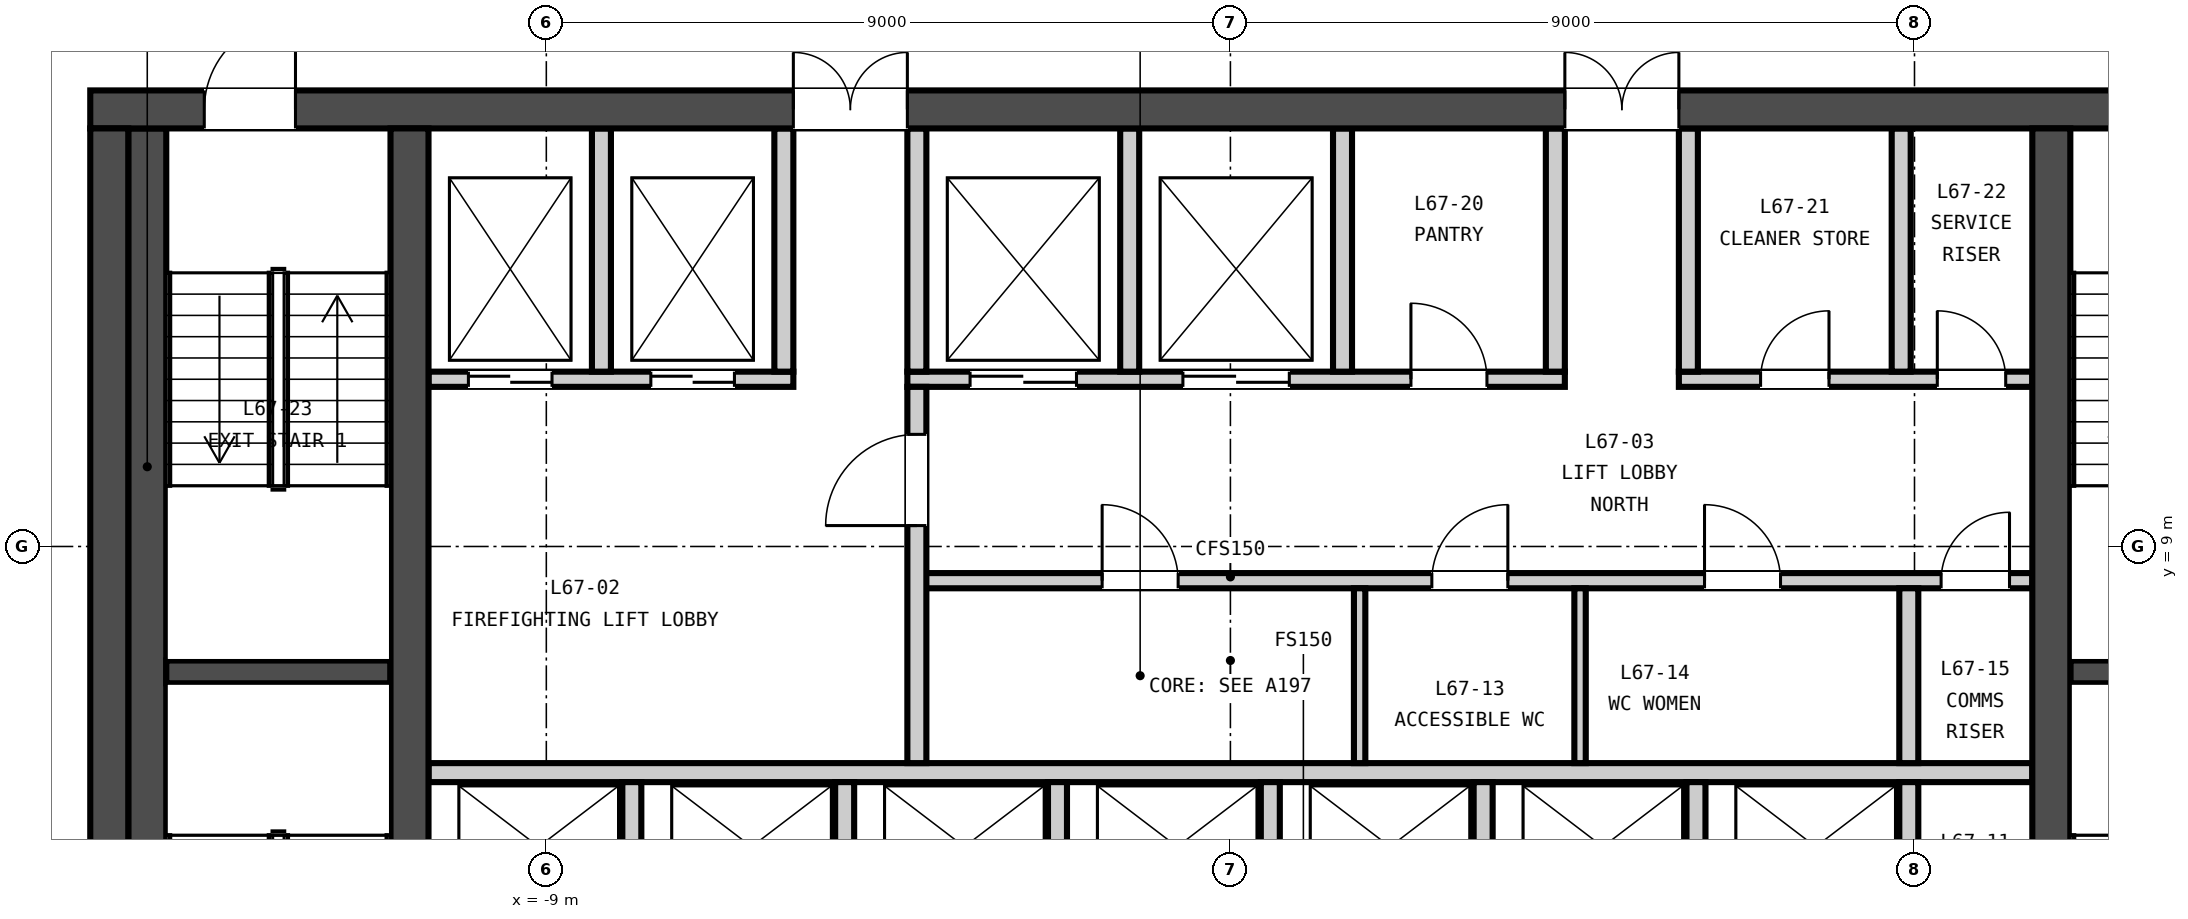
"""IFC4 building model, lengths in metres.
Left out: names, types, materials, properties, quantities, classifications, styles, units other than length and angle.
Written with IfcOpenShell. Run it as: python <this file> out.ifc"""

import sys

from ifc_helpers import new_model, si_unit, direction, frame, frame_2d, origin, place, context, subcontext, project, spatial, rectangle, extrude, element, fill, save


model = new_model("IFC4")
c1 = context("Model", 3, precision=1e-05, world=origin(), true_north=direction((0.0, 1.0)))
c2 = subcontext(c1, "Body", "Model", "MODEL_VIEW")
j1 = project(units=[si_unit("LENGTHUNIT", "METRE"), si_unit("PLANEANGLEUNIT", "RADIAN")], contexts=[c1])
p1 = place(None, origin())
s1 = spatial("IfcSite", under=j1, at=p1, CompositionType="ELEMENT")
p2 = place(p1, origin())
s2 = spatial("IfcBuilding", under=s1, at=p2, CompositionType="ELEMENT")
p3 = place(p2, frame((0.0, 0.0, 264.6)))
s3 = spatial("IfcBuildingStorey", under=s2, at=p3, CompositionType="ELEMENT", Elevation=264.6)
p4 = place(p3, frame((-15.0, 14.75, -0.15), z_axis=(0.0, 0.0, 1.0), x_axis=(1.0, 0.0, 0.0)))
e1 = element("IfcWall", 1, at=p4, inside=s3, PredefinedType="SOLIDWALL", context=c2, shape_type="SweptSolid", body=[
    extrude(rectangle(XDim=30.0, YDim=0.5, at=frame_2d((15.0, 0.0))), origin(), (0.0, 0.0, 1.0), 3.65),
])
p5 = place(p4, frame((9.25, 0.0, 0.15)))
e2 = element("IfcOpeningElement", 2, at=p5, cuts=e1, PredefinedType="OPENING", context=c2, shape_type="SweptSolid", body=[
    extrude(rectangle(XDim=1.5, YDim=2.1, at=frame_2d((0.75, 1.05))), frame((0.0, 0.26, 0.0), z_axis=(0.0, -1.0, 0.0), x_axis=(1.0, 0.0, 0.0)), (0.0, 0.0, 1.0), 0.52),
])
p6 = place(p4, frame((19.4, 0.0, 0.15)))
e3 = element("IfcOpeningElement", 3, at=p6, cuts=e1, PredefinedType="OPENING", context=c2, shape_type="SweptSolid", body=[
    extrude(rectangle(XDim=1.5, YDim=2.1, at=frame_2d((0.75, 1.05))), frame((0.0, 0.26, 0.0), z_axis=(0.0, -1.0, 0.0), x_axis=(1.0, 0.0, 0.0)), (0.0, 0.0, 1.0), 0.52),
])
p7 = place(p4, frame((1.5, 0.0, 0.15)))
e4 = element("IfcOpeningElement", 4, at=p7, cuts=e1, PredefinedType="OPENING", context=c2, shape_type="SweptSolid", body=[
    extrude(rectangle(XDim=1.2, YDim=2.1, at=frame_2d((0.6, 1.05))), frame((0.0, 0.26, 0.0), z_axis=(0.0, -1.0, 0.0), x_axis=(1.0, 0.0, 0.0)), (0.0, 0.0, 1.0), 0.52),
])
p8 = place(p4, frame((27.3, 0.0, 0.15)))
e5 = element("IfcOpeningElement", 5, at=p8, cuts=e1, PredefinedType="OPENING", context=c2, shape_type="SweptSolid", body=[
    extrude(rectangle(XDim=1.2, YDim=2.1, at=frame_2d((0.6, 1.05))), frame((0.0, 0.26, 0.0), z_axis=(0.0, -1.0, 0.0), x_axis=(1.0, 0.0, 0.0)), (0.0, 0.0, 1.0), 0.52),
])
for number, where, z_axis, x_axis in (
    (6, (-14.75, 0.5, -0.15), (0.0, 0.0, 1.0), (0.0, 1.0, 0.0)),
    (7, (-10.8, 0.5, -0.15), (0.0, 0.0, 1.0), (0.0, 1.0, 0.0)),
    (8, (10.8, 0.5, -0.15), (0.0, 0.0, 1.0), (0.0, 1.0, 0.0)),
):
    element("IfcWall", number, at=place(p3, frame(where, z_axis=z_axis, x_axis=x_axis)), inside=s3, PredefinedType="SOLIDWALL", context=c2, shape_type="SweptSolid", body=[
        extrude(rectangle(XDim=14.0, YDim=0.5, at=frame_2d((7.0, 0.0))), origin(), (0.0, 0.0, 1.0), 3.65),
    ])
p9 = place(p3, frame((-10.55, 6.025, 0.0), z_axis=(0.0, 0.0, 1.0), x_axis=(1.0, 0.0, 0.0)))
e9 = element("IfcWall", 9, at=p9, inside=s3, PredefinedType="PARTITIONING", context=c2, shape_type="SweptSolid", body=[
    extrude(rectangle(XDim=21.1, YDim=0.25, at=frame_2d((10.55, 0.0))), origin(), (0.0, 0.0, 1.0), 3.5),
])
p10 = place(p3, frame((-4.125, 8.55, 0.0), z_axis=(0.0, 0.0, 1.0), x_axis=(1.0, 0.0, 0.0)))
e10 = element("IfcWall", 10, at=p10, inside=s3, PredefinedType="PARTITIONING", context=c2, shape_type="SweptSolid", body=[
    extrude(rectangle(XDim=14.675, YDim=0.2, at=frame_2d((7.337, 0.0))), origin(), (0.0, 0.0, 1.0), 3.5),
])
p11 = place(p10, frame((2.438, 0.0, 0.0)))
e11 = element("IfcOpeningElement", 11, at=p11, cuts=e10, PredefinedType="OPENING", context=c2, shape_type="SweptSolid", body=[
    extrude(rectangle(XDim=1.0, YDim=2.1, at=frame_2d((0.5, 1.05))), frame((0.0, 0.11, 0.0), z_axis=(0.0, -1.0, 0.0), x_axis=(1.0, 0.0, 0.0)), (0.0, 0.0, 1.0), 0.22),
])
p12 = place(p10, frame((6.775, 0.0, 0.0)))
e12 = element("IfcOpeningElement", 12, at=p12, cuts=e10, PredefinedType="OPENING", context=c2, shape_type="SweptSolid", body=[
    extrude(rectangle(XDim=1.0, YDim=2.1, at=frame_2d((0.5, 1.05))), frame((0.0, 0.11, 0.0), z_axis=(0.0, -1.0, 0.0), x_axis=(1.0, 0.0, 0.0)), (0.0, 0.0, 1.0), 0.22),
])
p13 = place(p10, frame((10.363, 0.0, 0.0)))
e13 = element("IfcOpeningElement", 13, at=p13, cuts=e10, PredefinedType="OPENING", context=c2, shape_type="SweptSolid", body=[
    extrude(rectangle(XDim=1.0, YDim=2.1, at=frame_2d((0.5, 1.05))), frame((0.0, 0.11, 0.0), z_axis=(0.0, -1.0, 0.0), x_axis=(1.0, 0.0, 0.0)), (0.0, 0.0, 1.0), 0.22),
])
p14 = place(p10, frame((13.475, 0.0, 0.0)))
e14 = element("IfcOpeningElement", 14, at=p14, cuts=e10, PredefinedType="OPENING", context=c2, shape_type="SweptSolid", body=[
    extrude(rectangle(XDim=0.9, YDim=2.1, at=frame_2d((0.45, 1.05))), frame((0.0, 0.11, 0.0), z_axis=(0.0, -1.0, 0.0), x_axis=(1.0, 0.0, 0.0)), (0.0, 0.0, 1.0), 0.22),
])
p15 = place(p3, frame((-10.55, 11.2, 0.0), z_axis=(0.0, 0.0, 1.0), x_axis=(1.0, 0.0, 0.0)))
e15 = element("IfcWall", 15, at=p15, inside=s3, PredefinedType="PARTITIONING", context=c2, shape_type="SweptSolid", body=[
    extrude(rectangle(XDim=4.8, YDim=0.2, at=frame_2d((2.4, 0.0))), origin(), (0.0, 0.0, 1.0), 3.5),
])
p16 = place(p15, frame((0.525, 0.0, 0.0)))
e16 = element("IfcOpeningElement", 16, at=p16, cuts=e15, PredefinedType="OPENING", context=c2, shape_type="SweptSolid", body=[
    extrude(rectangle(XDim=1.1, YDim=2.1, at=frame_2d((0.55, 1.05))), frame((0.0, 0.11, 0.0), z_axis=(0.0, -1.0, 0.0), x_axis=(1.0, 0.0, 0.0)), (0.0, 0.0, 1.0), 0.22),
])
p17 = place(p15, frame((2.925, 0.0, 0.0)))
e17 = element("IfcOpeningElement", 17, at=p17, cuts=e15, PredefinedType="OPENING", context=c2, shape_type="SweptSolid", body=[
    extrude(rectangle(XDim=1.1, YDim=2.1, at=frame_2d((0.55, 1.05))), frame((0.0, 0.11, 0.0), z_axis=(0.0, -1.0, 0.0), x_axis=(1.0, 0.0, 0.0)), (0.0, 0.0, 1.0), 0.22),
])
p18 = place(p3, frame((-4.25, 11.2, 0.0), z_axis=(0.0, 0.0, 1.0), x_axis=(1.0, 0.0, 0.0)))
e18 = element("IfcWall", 18, at=p18, inside=s3, PredefinedType="PARTITIONING", context=c2, shape_type="SweptSolid", body=[
    extrude(rectangle(XDim=8.65, YDim=0.2, at=frame_2d((4.325, 0.0))), origin(), (0.0, 0.0, 1.0), 3.5),
])
p19 = place(p18, frame((0.825, 0.0, 0.0)))
e19 = element("IfcOpeningElement", 19, at=p19, cuts=e18, PredefinedType="OPENING", context=c2, shape_type="SweptSolid", body=[
    extrude(rectangle(XDim=1.4, YDim=2.1, at=frame_2d((0.7, 1.05))), frame((0.0, 0.11, 0.0), z_axis=(0.0, -1.0, 0.0), x_axis=(1.0, 0.0, 0.0)), (0.0, 0.0, 1.0), 0.22),
])
p20 = place(p18, frame((3.625, 0.0, 0.0)))
e20 = element("IfcOpeningElement", 20, at=p20, cuts=e18, PredefinedType="OPENING", context=c2, shape_type="SweptSolid", body=[
    extrude(rectangle(XDim=1.4, YDim=2.1, at=frame_2d((0.7, 1.05))), frame((0.0, 0.11, 0.0), z_axis=(0.0, -1.0, 0.0), x_axis=(1.0, 0.0, 0.0)), (0.0, 0.0, 1.0), 0.22),
])
p21 = place(p18, frame((6.625, 0.0, 0.0)))
e21 = element("IfcOpeningElement", 21, at=p21, cuts=e18, PredefinedType="OPENING", context=c2, shape_type="SweptSolid", body=[
    extrude(rectangle(XDim=1.0, YDim=2.1, at=frame_2d((0.5, 1.05))), frame((0.0, 0.11, 0.0), z_axis=(0.0, -1.0, 0.0), x_axis=(1.0, 0.0, 0.0)), (0.0, 0.0, 1.0), 0.22),
])
p22 = place(p3, frame((5.9, 11.2, 0.0), z_axis=(0.0, 0.0, 1.0), x_axis=(1.0, 0.0, 0.0)))
e22 = element("IfcWall", 22, at=p22, inside=s3, PredefinedType="PARTITIONING", context=c2, shape_type="SweptSolid", body=[
    extrude(rectangle(XDim=4.65, YDim=0.2, at=frame_2d((2.325, 0.0))), origin(), (0.0, 0.0, 1.0), 3.5),
])
p23 = place(p22, frame((1.075, 0.0, 0.0)))
e23 = element("IfcOpeningElement", 23, at=p23, cuts=e22, PredefinedType="OPENING", context=c2, shape_type="SweptSolid", body=[
    extrude(rectangle(XDim=0.9, YDim=2.1, at=frame_2d((0.45, 1.05))), frame((0.0, 0.11, 0.0), z_axis=(0.0, -1.0, 0.0), x_axis=(1.0, 0.0, 0.0)), (0.0, 0.0, 1.0), 0.22),
])
p24 = place(p22, frame((3.4, 0.0, 0.0)))
e24 = element("IfcOpeningElement", 24, at=p24, cuts=e22, PredefinedType="OPENING", context=c2, shape_type="SweptSolid", body=[
    extrude(rectangle(XDim=0.9, YDim=2.1, at=frame_2d((0.45, 1.05))), frame((0.0, 0.11, 0.0), z_axis=(0.0, -1.0, 0.0), x_axis=(1.0, 0.0, 0.0)), (0.0, 0.0, 1.0), 0.22),
])
p25 = place(p3, frame((-4.125, 6.15, 0.0), z_axis=(0.0, 0.0, 1.0), x_axis=(0.0, 1.0, 0.0)))
e25 = element("IfcWall", 25, at=p25, inside=s3, PredefinedType="PARTITIONING", context=c2, shape_type="SweptSolid", body=[
    extrude(rectangle(XDim=4.95, YDim=0.25, at=frame_2d((2.475, 0.0))), origin(), (0.0, 0.0, 1.0), 3.5),
])
p26 = place(p25, frame((3.125, 0.0, 0.0)))
e26 = element("IfcOpeningElement", 26, at=p26, cuts=e25, PredefinedType="OPENING", context=c2, shape_type="SweptSolid", body=[
    extrude(rectangle(XDim=1.2, YDim=2.1, at=frame_2d((0.6, 1.05))), frame((0.0, 0.135, 0.0), z_axis=(0.0, -1.0, 0.0), x_axis=(1.0, 0.0, 0.0)), (0.0, 0.0, 1.0), 0.27),
])
for number, where, z_axis, x_axis in (
    (27, (-7.875, 3.6, 0.0), (0.0, 0.0, 1.0), (0.0, 1.0, 0.0)),
    (28, (-5.075, 3.6, 0.0), (0.0, 0.0, 1.0), (0.0, 1.0, 0.0)),
    (29, (-2.275, 3.6, 0.0), (0.0, 0.0, 1.0), (0.0, 1.0, 0.0)),
    (30, (0.525, 3.6, 0.0), (0.0, 0.0, 1.0), (0.0, 1.0, 0.0)),
    (31, (3.325, 3.6, 0.0), (0.0, 0.0, 1.0), (0.0, 1.0, 0.0)),
    (32, (6.125, 3.6, 0.0), (0.0, 0.0, 1.0), (0.0, 1.0, 0.0)),
    (33, (8.925, 3.6, 0.0), (0.0, 0.0, 1.0), (0.0, 1.0, 0.0)),
):
    element("IfcWall", number, at=place(p3, frame(where, z_axis=z_axis, x_axis=x_axis)), inside=s3, PredefinedType="PARTITIONING", context=c2, shape_type="SweptSolid", body=[
        extrude(rectangle(XDim=2.3, YDim=0.25, at=frame_2d((1.15, 0.0))), origin(), (0.0, 0.0, 1.0), 3.5),
    ])
for number, where, z_axis, x_axis in (
    (34, (1.7, 6.15, 0.0), (0.0, 0.0, 1.0), (0.0, 1.0, 0.0)),
    (35, (4.6, 6.15, 0.0), (0.0, 0.0, 1.0), (0.0, 1.0, 0.0)),
):
    element("IfcWall", number, at=place(p3, frame(where, z_axis=z_axis, x_axis=x_axis)), inside=s3, PredefinedType="PARTITIONING", context=c2, shape_type="SweptSolid", body=[
        extrude(rectangle(XDim=2.3, YDim=0.15, at=frame_2d((1.15, 0.0))), origin(), (0.0, 0.0, 1.0), 3.5),
    ])
p27 = place(p3, frame((8.925, 6.15, 0.0), z_axis=(0.0, 0.0, 1.0), x_axis=(0.0, 1.0, 0.0)))
e36 = element("IfcWall", 36, at=p27, inside=s3, PredefinedType="PARTITIONING", context=c2, shape_type="SweptSolid", body=[
    extrude(rectangle(XDim=2.3, YDim=0.25, at=frame_2d((1.15, 0.0))), origin(), (0.0, 0.0, 1.0), 3.5),
])
for number, where, z_axis, x_axis in (
    (37, (-8.275, 11.3, 0.0), (0.0, 0.0, 1.0), (0.0, 1.0, 0.0)),
    (38, (-5.875, 11.3, 0.0), (0.0, 0.0, 1.0), (0.0, 1.0, 0.0)),
    (39, (-4.125, 11.3, 0.0), (0.0, 0.0, 1.0), (0.0, 1.0, 0.0)),
    (40, (-1.325, 11.3, 0.0), (0.0, 0.0, 1.0), (0.0, 1.0, 0.0)),
    (41, (1.475, 11.3, 0.0), (0.0, 0.0, 1.0), (0.0, 1.0, 0.0)),
    (42, (4.275, 11.3, 0.0), (0.0, 0.0, 1.0), (0.0, 1.0, 0.0)),
    (43, (6.025, 11.3, 0.0), (0.0, 0.0, 1.0), (0.0, 1.0, 0.0)),
    (44, (8.825, 11.3, 0.0), (0.0, 0.0, 1.0), (0.0, 1.0, 0.0)),
):
    element("IfcWall", number, at=place(p3, frame(where, z_axis=z_axis, x_axis=x_axis)), inside=s3, PredefinedType="PARTITIONING", context=c2, shape_type="SweptSolid", body=[
        extrude(rectangle(XDim=3.2, YDim=0.25, at=frame_2d((1.6, 0.0))), origin(), (0.0, 0.0, 1.0), 3.5),
    ])
p28 = place(p3, frame((-14.0, 7.35, 0.0), z_axis=(0.0, 0.0, 1.0), x_axis=(1.0, 0.0, 0.0)))
e45 = element("IfcWall", 45, at=p28, inside=s3, PredefinedType="SOLIDWALL", context=c2, shape_type="SweptSolid", body=[
    extrude(rectangle(XDim=2.95, YDim=0.3, at=frame_2d((1.475, 0.0))), origin(), (0.0, 0.0, 1.0), 3.5),
])
p29 = place(p3, frame((-14.25, 0.5, 0.0), z_axis=(0.0, 0.0, 1.0), x_axis=(0.0, 1.0, 0.0)))
e46 = element("IfcWall", 46, at=p29, inside=s3, PredefinedType="SOLIDWALL", context=c2, shape_type="SweptSolid", body=[
    extrude(rectangle(XDim=14.0, YDim=0.5, at=frame_2d((7.0, 0.0))), origin(), (0.0, 0.0, 1.0), 3.5),
])
p30 = place(p3, frame((11.05, 7.35, 0.0), z_axis=(0.0, 0.0, 1.0), x_axis=(1.0, 0.0, 0.0)))
e47 = element("IfcWall", 47, at=p30, inside=s3, PredefinedType="SOLIDWALL", context=c2, shape_type="SweptSolid", body=[
    extrude(rectangle(XDim=2.95, YDim=0.3, at=frame_2d((1.475, 0.0))), origin(), (0.0, 0.0, 1.0), 3.5),
])
p31 = place(p3, frame((-17.377, 11.232, 0.0), z_axis=(0.0, 0.0, 1.0), x_axis=(0.309001632963, 0.951061507383, 0.0)))
e48 = element("IfcWall", 48, at=p31, inside=s3, PredefinedType="PARTITIONING", context=c2, shape_type="SweptSolid", body=[
    extrude(rectangle(XDim=6.211, YDim=0.15, at=frame_2d((3.105, 0.0))), origin(), (0.0, 0.0, 1.0), 2.75),
])
p32 = place(p26, origin())
e49 = element("IfcDoor", 49, at=p32, inside=s3, OperationType="SINGLE_SWING_LEFT", PredefinedType="DOOR", context=c2, shape_type="SweptSolid", body=[
    extrude(rectangle(XDim=1.2, YDim=2.1, at=frame_2d((0.6, 1.05))), frame((0.0, 0.025, 0.0), z_axis=(0.0, -1.0, 0.0), x_axis=(1.0, 0.0, 0.0)), (0.0, 0.0, 1.0), 0.05),
])
fill(e26, e49)
p33 = place(p11, origin())
e50 = element("IfcDoor", 50, at=p33, inside=s3, OperationType="SINGLE_SWING_LEFT", PredefinedType="DOOR", context=c2, shape_type="SweptSolid", body=[
    extrude(rectangle(XDim=1.0, YDim=2.1, at=frame_2d((0.5, 1.05))), frame((0.0, 0.025, 0.0), z_axis=(0.0, -1.0, 0.0), x_axis=(1.0, 0.0, 0.0)), (0.0, 0.0, 1.0), 0.05),
])
fill(e11, e50)
p34 = place(p12, origin())
e51 = element("IfcDoor", 51, at=p34, inside=s3, OperationType="SINGLE_SWING_RIGHT", PredefinedType="DOOR", context=c2, shape_type="SweptSolid", body=[
    extrude(rectangle(XDim=1.0, YDim=2.1, at=frame_2d((0.5, 1.05))), frame((0.0, 0.025, 0.0), z_axis=(0.0, -1.0, 0.0), x_axis=(1.0, 0.0, 0.0)), (0.0, 0.0, 1.0), 0.05),
])
fill(e12, e51)
p35 = place(p13, origin())
e52 = element("IfcDoor", 52, at=p35, inside=s3, OperationType="SINGLE_SWING_LEFT", PredefinedType="DOOR", context=c2, shape_type="SweptSolid", body=[
    extrude(rectangle(XDim=1.0, YDim=2.1, at=frame_2d((0.5, 1.05))), frame((0.0, 0.025, 0.0), z_axis=(0.0, -1.0, 0.0), x_axis=(1.0, 0.0, 0.0)), (0.0, 0.0, 1.0), 0.05),
])
fill(e13, e52)
p36 = place(p14, origin())
e53 = element("IfcDoor", 53, at=p36, inside=s3, OperationType="SINGLE_SWING_RIGHT", PredefinedType="DOOR", context=c2, shape_type="SweptSolid", body=[
    extrude(rectangle(XDim=0.9, YDim=2.1, at=frame_2d((0.45, 1.05))), frame((0.0, 0.025, 0.0), z_axis=(0.0, -1.0, 0.0), x_axis=(1.0, 0.0, 0.0)), (0.0, 0.0, 1.0), 0.05),
])
fill(e14, e53)
p37 = place(p16, origin())
e54 = element("IfcDoor", 54, at=p37, inside=s3, OperationType="DOUBLE_DOOR_SLIDING", PredefinedType="DOOR", context=c2, shape_type="SweptSolid", body=[
    extrude(rectangle(XDim=1.1, YDim=2.1, at=frame_2d((0.55, 1.05))), frame((0.0, 0.025, 0.0), z_axis=(0.0, -1.0, 0.0), x_axis=(1.0, 0.0, 0.0)), (0.0, 0.0, 1.0), 0.05),
])
fill(e16, e54)
p38 = place(p17, origin())
e55 = element("IfcDoor", 55, at=p38, inside=s3, OperationType="DOUBLE_DOOR_SLIDING", PredefinedType="DOOR", context=c2, shape_type="SweptSolid", body=[
    extrude(rectangle(XDim=1.1, YDim=2.1, at=frame_2d((0.55, 1.05))), frame((0.0, 0.025, 0.0), z_axis=(0.0, -1.0, 0.0), x_axis=(1.0, 0.0, 0.0)), (0.0, 0.0, 1.0), 0.05),
])
fill(e17, e55)
p39 = place(p19, origin())
e56 = element("IfcDoor", 56, at=p39, inside=s3, OperationType="DOUBLE_DOOR_SLIDING", PredefinedType="DOOR", context=c2, shape_type="SweptSolid", body=[
    extrude(rectangle(XDim=1.4, YDim=2.1, at=frame_2d((0.7, 1.05))), frame((0.0, 0.025, 0.0), z_axis=(0.0, -1.0, 0.0), x_axis=(1.0, 0.0, 0.0)), (0.0, 0.0, 1.0), 0.05),
])
fill(e19, e56)
p40 = place(p20, origin())
e57 = element("IfcDoor", 57, at=p40, inside=s3, OperationType="DOUBLE_DOOR_SLIDING", PredefinedType="DOOR", context=c2, shape_type="SweptSolid", body=[
    extrude(rectangle(XDim=1.4, YDim=2.1, at=frame_2d((0.7, 1.05))), frame((0.0, 0.025, 0.0), z_axis=(0.0, -1.0, 0.0), x_axis=(1.0, 0.0, 0.0)), (0.0, 0.0, 1.0), 0.05),
])
fill(e20, e57)
p41 = place(p21, origin())
e58 = element("IfcDoor", 58, at=p41, inside=s3, OperationType="SINGLE_SWING_LEFT", PredefinedType="DOOR", context=c2, shape_type="SweptSolid", body=[
    extrude(rectangle(XDim=1.0, YDim=2.1, at=frame_2d((0.5, 1.05))), frame((0.0, 0.025, 0.0), z_axis=(0.0, -1.0, 0.0), x_axis=(1.0, 0.0, 0.0)), (0.0, 0.0, 1.0), 0.05),
])
fill(e21, e58)
p42 = place(p23, origin())
e59 = element("IfcDoor", 59, at=p42, inside=s3, OperationType="SINGLE_SWING_RIGHT", PredefinedType="DOOR", context=c2, shape_type="SweptSolid", body=[
    extrude(rectangle(XDim=0.9, YDim=2.1, at=frame_2d((0.45, 1.05))), frame((0.0, 0.025, 0.0), z_axis=(0.0, -1.0, 0.0), x_axis=(1.0, 0.0, 0.0)), (0.0, 0.0, 1.0), 0.05),
])
fill(e23, e59)
p43 = place(p24, origin())
e60 = element("IfcDoor", 60, at=p43, inside=s3, OperationType="SINGLE_SWING_LEFT", PredefinedType="DOOR", context=c2, shape_type="SweptSolid", body=[
    extrude(rectangle(XDim=0.9, YDim=2.1, at=frame_2d((0.45, 1.05))), frame((0.0, 0.025, 0.0), z_axis=(0.0, -1.0, 0.0), x_axis=(1.0, 0.0, 0.0)), (0.0, 0.0, 1.0), 0.05),
])
fill(e24, e60)
p44 = place(p5, origin())
e61 = element("IfcDoor", 61, at=p44, inside=s3, OperationType="DOUBLE_DOOR_SINGLE_SWING", PredefinedType="DOOR", context=c2, shape_type="SweptSolid", body=[
    extrude(rectangle(XDim=1.5, YDim=2.1, at=frame_2d((0.75, 1.05))), frame((0.0, 0.025, 0.0), z_axis=(0.0, -1.0, 0.0), x_axis=(1.0, 0.0, 0.0)), (0.0, 0.0, 1.0), 0.05),
])
fill(e2, e61)
p45 = place(p6, origin())
e62 = element("IfcDoor", 62, at=p45, inside=s3, OperationType="DOUBLE_DOOR_SINGLE_SWING", PredefinedType="DOOR", context=c2, shape_type="SweptSolid", body=[
    extrude(rectangle(XDim=1.5, YDim=2.1, at=frame_2d((0.75, 1.05))), frame((0.0, 0.025, 0.0), z_axis=(0.0, -1.0, 0.0), x_axis=(1.0, 0.0, 0.0)), (0.0, 0.0, 1.0), 0.05),
])
fill(e3, e62)
p46 = place(p7, origin())
e63 = element("IfcDoor", 63, at=p46, inside=s3, OperationType="SINGLE_SWING_RIGHT", PredefinedType="DOOR", context=c2, shape_type="SweptSolid", body=[
    extrude(rectangle(XDim=1.2, YDim=2.1, at=frame_2d((0.6, 1.05))), frame((0.0, 0.025, 0.0), z_axis=(0.0, -1.0, 0.0), x_axis=(1.0, 0.0, 0.0)), (0.0, 0.0, 1.0), 0.05),
])
fill(e4, e63)
save(model, sys.argv[1])
